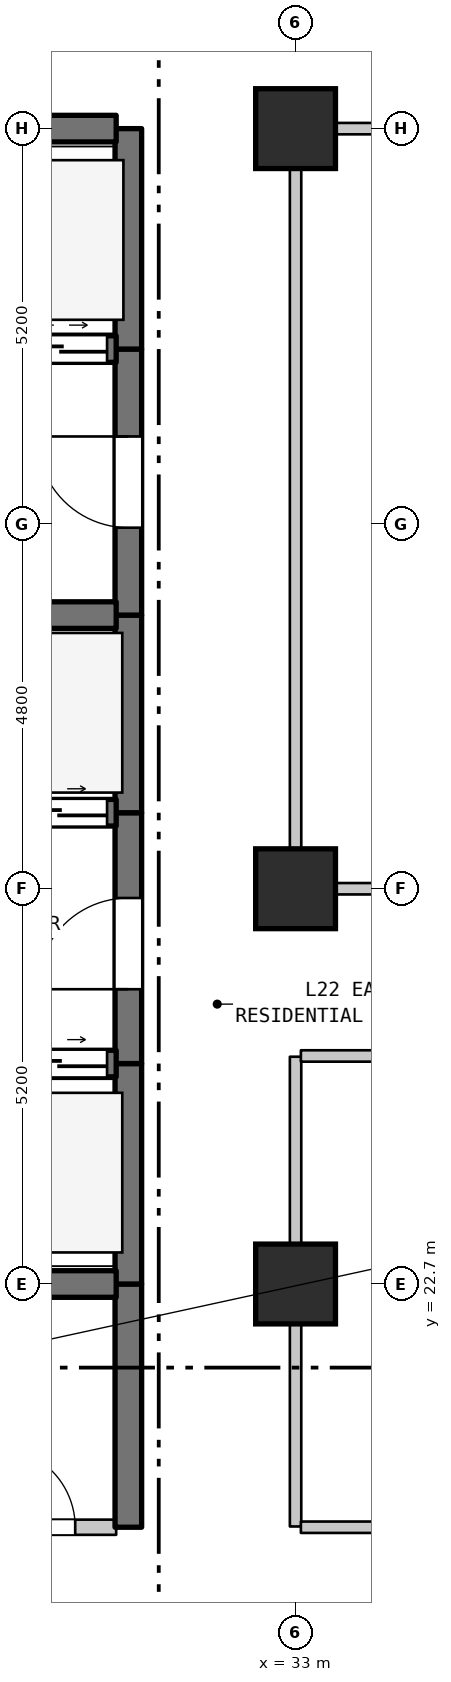
"""IFC4 building model, lengths in metres.
Left out: names, types, materials, properties, quantities, classifications, styles, units other than length and angle.
Written with IfcOpenShell. Run it as: python <this file> out.ifc"""

import sys

from ifc_helpers import new_model, si_unit, direction, frame, frame_2d, origin, origin_2d, place, context, subcontext, project, spatial, rectangle, extrude, element, fill, save


model = new_model("IFC4")
c1 = context("Model", 3, precision=1e-05, world=origin(), true_north=direction((0.0, 1.0)))
c2 = subcontext(c1, "Body", "Model", "MODEL_VIEW")
j1 = project(units=[si_unit("LENGTHUNIT", "METRE"), si_unit("PLANEANGLEUNIT", "RADIAN")], contexts=[c1])
p1 = place(None, origin())
s1 = spatial("IfcSite", under=j1, at=p1, CompositionType="ELEMENT")
p2 = place(p1, origin())
s2 = spatial("IfcBuilding", under=s1, at=p2, CompositionType="ELEMENT")
p3 = place(p2, frame((0.0, 0.0, 94.6)))
s3 = spatial("IfcBuildingStorey", under=s2, at=p3, CompositionType="ELEMENT", Elevation=94.6)
for number, where, z_axis, x_axis in (
    (1, (33.0, 22.7, 0.0), (0.0, 0.0, 1.0), (1.0, 0.0, 0.0)),
    (2, (33.0, 27.9, 0.0), (0.0, 0.0, 1.0), (1.0, 0.0, 0.0)),
    (3, (33.0, 37.9, 0.0), (0.0, 0.0, 1.0), (1.0, 0.0, 0.0)),
):
    element("IfcColumn", number, at=place(p3, frame(where, z_axis=z_axis, x_axis=x_axis)), inside=s3, PredefinedType="COLUMN", context=c2, shape_type="SweptSolid", body=[
        extrude(rectangle(XDim=1.05, YDim=1.05, at=origin_2d()), origin(), (0.0, 0.0, 1.0), 3.7),
    ])
p4 = place(p3, frame((30.8, 19.5, 0.0), z_axis=(0.0, 0.0, 1.0), x_axis=(0.0, 1.0, 0.0)))
e4 = element("IfcWall", 4, at=p4, inside=s3, PredefinedType="SHEAR", context=c2, shape_type="SweptSolid", body=[
    extrude(rectangle(XDim=3.2, YDim=0.35, at=frame_2d((1.6, 0.0))), origin(), (0.0, 0.0, 1.0), 3.385),
])
p5 = place(p3, frame((30.8, 22.7, 0.0), z_axis=(0.0, 0.0, 1.0), x_axis=(0.0, 1.0, 0.0)))
e5 = element("IfcWall", 5, at=p5, inside=s3, PredefinedType="SHEAR", context=c2, shape_type="SweptSolid", body=[
    extrude(rectangle(XDim=2.9, YDim=0.35, at=frame_2d((1.45, 0.0))), origin(), (0.0, 0.0, 1.0), 3.385),
])
p6 = place(p3, frame((30.8, 25.6, 0.0), z_axis=(0.0, 0.0, 1.0), x_axis=(0.0, 1.0, 0.0)))
e6 = element("IfcWall", 6, at=p6, inside=s3, PredefinedType="SHEAR", context=c2, shape_type="SweptSolid", body=[
    extrude(rectangle(XDim=3.3, YDim=0.35, at=frame_2d((1.65, 0.0))), origin(), (0.0, 0.0, 1.0), 3.385),
])
p7 = place(p6, frame((0.978, 0.0, 0.0)))
e7 = element("IfcOpeningElement", 7, at=p7, cuts=e6, PredefinedType="OPENING", context=c2, shape_type="SweptSolid", body=[
    extrude(rectangle(XDim=1.2, YDim=2.2, at=frame_2d((0.6, 1.1))), frame((0.0, 0.185, 0.0), z_axis=(0.0, -1.0, 0.0), x_axis=(1.0, 0.0, 0.0)), (0.0, 0.0, 1.0), 0.37),
])
p8 = place(p3, frame((30.8, 28.9, 0.0), z_axis=(0.0, 0.0, 1.0), x_axis=(0.0, 1.0, 0.0)))
e8 = element("IfcWall", 8, at=p8, inside=s3, PredefinedType="SHEAR", context=c2, shape_type="SweptSolid", body=[
    extrude(rectangle(XDim=2.6, YDim=0.35, at=frame_2d((1.3, 0.0))), origin(), (0.0, 0.0, 1.0), 3.385),
])
p9 = place(p3, frame((30.8, 31.5, 0.0), z_axis=(0.0, 0.0, 1.0), x_axis=(0.0, 1.0, 0.0)))
e9 = element("IfcWall", 9, at=p9, inside=s3, PredefinedType="SHEAR", context=c2, shape_type="SweptSolid", body=[
    extrude(rectangle(XDim=3.5, YDim=0.35, at=frame_2d((1.75, 0.0))), origin(), (0.0, 0.0, 1.0), 3.385),
])
p10 = place(p9, frame((1.15, 0.0, 0.0)))
e10 = element("IfcOpeningElement", 10, at=p10, cuts=e9, PredefinedType="OPENING", context=c2, shape_type="SweptSolid", body=[
    extrude(rectangle(XDim=1.2, YDim=2.2, at=frame_2d((0.6, 1.1))), frame((0.0, 0.185, 0.0), z_axis=(0.0, -1.0, 0.0), x_axis=(1.0, 0.0, 0.0)), (0.0, 0.0, 1.0), 0.37),
])
p11 = place(p3, frame((30.8, 35.0, 0.0), z_axis=(0.0, 0.0, 1.0), x_axis=(0.0, 1.0, 0.0)))
e11 = element("IfcWall", 11, at=p11, inside=s3, PredefinedType="SHEAR", context=c2, shape_type="SweptSolid", body=[
    extrude(rectangle(XDim=2.9, YDim=0.35, at=frame_2d((1.45, 0.0))), origin(), (0.0, 0.0, 1.0), 3.385),
])
p12 = place(p3, frame((33.0, 19.51, 0.0), z_axis=(0.0, 0.0, 1.0), x_axis=(0.0, 1.0, 0.0)))
e12 = element("IfcWall", 12, at=p12, inside=s3, PredefinedType="STANDARD", context=c2, shape_type="SweptSolid", body=[
    extrude(rectangle(XDim=6.18, YDim=0.15, at=frame_2d((3.09, 0.0))), origin(), (0.0, 0.0, 1.0), 2.935),
])
p13 = place(p3, frame((33.0, 27.91, 0.0), z_axis=(0.0, 0.0, 1.0), x_axis=(0.0, 1.0, 0.0)))
e13 = element("IfcWall", 13, at=p13, inside=s3, PredefinedType="STANDARD", context=c2, shape_type="SweptSolid", body=[
    extrude(rectangle(XDim=9.98, YDim=0.15, at=frame_2d((4.99, 0.0))), origin(), (0.0, 0.0, 1.0), 2.885),
])
p14 = place(p3, frame((28.585, 19.5, 0.0), z_axis=(0.0, 0.0, 1.0), x_axis=(1.0, 0.0, 0.0)))
e14 = element("IfcWall", 14, at=p14, inside=s3, PredefinedType="STANDARD", context=c2, shape_type="SweptSolid", body=[
    extrude(rectangle(XDim=2.055, YDim=0.2, at=frame_2d((1.027, 0.0))), origin(), (0.0, 0.0, 1.0), 3.385),
])
p15 = place(p14, frame((0.466, 0.0, 0.0)))
e15 = element("IfcOpeningElement", 15, at=p15, cuts=e14, PredefinedType="OPENING", context=c2, shape_type="SweptSolid", body=[
    extrude(rectangle(XDim=1.05, YDim=2.15, at=frame_2d((0.525, 1.075))), frame((0.0, 0.11, 0.0), z_axis=(0.0, -1.0, 0.0), x_axis=(1.0, 0.0, 0.0)), (0.0, 0.0, 1.0), 0.22),
])
p16 = place(p3, frame((33.07, 19.5, 0.0), z_axis=(0.0, 0.0, 1.0), x_axis=(1.0, 0.0, 0.0)))
e16 = element("IfcWall", 16, at=p16, inside=s3, PredefinedType="STANDARD", context=c2, shape_type="SweptSolid", body=[
    extrude(rectangle(XDim=21.51, YDim=0.15, at=frame_2d((10.755, 0.0))), origin(), (0.0, 0.0, 1.0), 3.385),
])
p17 = place(p3, frame((28.585, 22.7, 0.0), z_axis=(0.0, 0.0, 1.0), x_axis=(1.0, 0.0, 0.0)))
e17 = element("IfcWall", 17, at=p17, inside=s3, PredefinedType="SHEAR", context=c2, shape_type="SweptSolid", body=[
    extrude(rectangle(XDim=2.055, YDim=0.35, at=frame_2d((1.027, 0.0))), origin(), (0.0, 0.0, 1.0), 3.385),
])
p18 = place(p3, frame((27.46, 25.6, 0.0), z_axis=(0.0, 0.0, 1.0), x_axis=(1.0, 0.0, 0.0)))
e18 = element("IfcWall", 18, at=p18, inside=s3, PredefinedType="SHEAR", context=c2, shape_type="SweptSolid", body=[
    extrude(rectangle(XDim=3.18, YDim=0.35, at=frame_2d((1.59, 0.0))), origin(), (0.0, 0.0, 1.0), 3.385),
])
p19 = place(p18, frame((0.12, 0.0, 0.0)))
e19 = element("IfcOpeningElement", 19, at=p19, cuts=e18, PredefinedType="OPENING", context=c2, shape_type="SweptSolid", body=[
    extrude(rectangle(XDim=1.25, YDim=2.2, at=frame_2d((0.625, 1.1))), frame((0.0, 0.185, 0.0), z_axis=(0.0, -1.0, 0.0), x_axis=(1.0, 0.0, 0.0)), (0.0, 0.0, 1.0), 0.37),
])
p20 = place(p18, frame((1.81, 0.0, 0.0)))
e20 = element("IfcOpeningElement", 20, at=p20, cuts=e18, PredefinedType="OPENING", context=c2, shape_type="SweptSolid", body=[
    extrude(rectangle(XDim=1.25, YDim=2.2, at=frame_2d((0.625, 1.1))), frame((0.0, 0.185, 0.0), z_axis=(0.0, -1.0, 0.0), x_axis=(1.0, 0.0, 0.0)), (0.0, 0.0, 1.0), 0.37),
])
p21 = place(p3, frame((33.07, 25.7, 0.0), z_axis=(0.0, 0.0, 1.0), x_axis=(1.0, 0.0, 0.0)))
e21 = element("IfcWall", 21, at=p21, inside=s3, PredefinedType="STANDARD", context=c2, shape_type="SweptSolid", body=[
    extrude(rectangle(XDim=21.51, YDim=0.15, at=frame_2d((10.755, 0.0))), origin(), (0.0, 0.0, 1.0), 3.385),
])
p22 = place(p3, frame((33.07, 27.9, 0.0), z_axis=(0.0, 0.0, 1.0), x_axis=(1.0, 0.0, 0.0)))
e22 = element("IfcWall", 22, at=p22, inside=s3, PredefinedType="STANDARD", context=c2, shape_type="SweptSolid", body=[
    extrude(rectangle(XDim=11.93, YDim=0.15, at=frame_2d((5.965, 0.0))), origin(), (0.0, 0.0, 1.0), 2.885),
])
p23 = place(p22, frame((10.185, 0.0, 0.0)))
e23 = element("IfcOpeningElement", 23, at=p23, cuts=e22, PredefinedType="OPENING", context=c2, shape_type="SweptSolid", body=[
    extrude(rectangle(XDim=1.0, YDim=2.15, at=frame_2d((0.5, 1.075))), frame((0.0, 0.085, 0.0), z_axis=(0.0, -1.0, 0.0), x_axis=(1.0, 0.0, 0.0)), (0.0, 0.0, 1.0), 0.17),
])
p24 = place(p3, frame((27.46, 28.9, 0.0), z_axis=(0.0, 0.0, 1.0), x_axis=(1.0, 0.0, 0.0)))
e24 = element("IfcWall", 24, at=p24, inside=s3, PredefinedType="SHEAR", context=c2, shape_type="SweptSolid", body=[
    extrude(rectangle(XDim=3.18, YDim=0.35, at=frame_2d((1.59, 0.0))), origin(), (0.0, 0.0, 1.0), 3.385),
])
p25 = place(p24, frame((0.12, 0.0, 0.0)))
e25 = element("IfcOpeningElement", 25, at=p25, cuts=e24, PredefinedType="OPENING", context=c2, shape_type="SweptSolid", body=[
    extrude(rectangle(XDim=1.25, YDim=2.2, at=frame_2d((0.625, 1.1))), frame((0.0, 0.185, 0.0), z_axis=(0.0, -1.0, 0.0), x_axis=(1.0, 0.0, 0.0)), (0.0, 0.0, 1.0), 0.37),
])
p26 = place(p24, frame((1.81, 0.0, 0.0)))
e26 = element("IfcOpeningElement", 26, at=p26, cuts=e24, PredefinedType="OPENING", context=c2, shape_type="SweptSolid", body=[
    extrude(rectangle(XDim=1.25, YDim=2.2, at=frame_2d((0.625, 1.1))), frame((0.0, 0.185, 0.0), z_axis=(0.0, -1.0, 0.0), x_axis=(1.0, 0.0, 0.0)), (0.0, 0.0, 1.0), 0.37),
])
p27 = place(p3, frame((27.46, 31.5, 0.0), z_axis=(0.0, 0.0, 1.0), x_axis=(1.0, 0.0, 0.0)))
e27 = element("IfcWall", 27, at=p27, inside=s3, PredefinedType="SHEAR", context=c2, shape_type="SweptSolid", body=[
    extrude(rectangle(XDim=3.18, YDim=0.35, at=frame_2d((1.59, 0.0))), origin(), (0.0, 0.0, 1.0), 3.385),
])
p28 = place(p3, frame((19.16, 35.0, 0.0), z_axis=(0.0, 0.0, 1.0), x_axis=(1.0, 0.0, 0.0)))
e28 = element("IfcWall", 28, at=p28, inside=s3, PredefinedType="SHEAR", context=c2, shape_type="SweptSolid", body=[
    extrude(rectangle(XDim=11.48, YDim=0.35, at=frame_2d((5.74, 0.0))), origin(), (0.0, 0.0, 1.0), 3.385),
])
p29 = place(p28, frame((0.365, 0.0, 0.0)))
e29 = element("IfcOpeningElement", 29, at=p29, cuts=e28, PredefinedType="OPENING", context=c2, shape_type="SweptSolid", body=[
    extrude(rectangle(XDim=1.35, YDim=2.2, at=frame_2d((0.675, 1.1))), frame((0.0, 0.185, 0.0), z_axis=(0.0, -1.0, 0.0), x_axis=(1.0, 0.0, 0.0)), (0.0, 0.0, 1.0), 0.37),
])
p30 = place(p28, frame((2.765, 0.0, 0.0)))
e30 = element("IfcOpeningElement", 30, at=p30, cuts=e28, PredefinedType="OPENING", context=c2, shape_type="SweptSolid", body=[
    extrude(rectangle(XDim=1.35, YDim=2.2, at=frame_2d((0.675, 1.1))), frame((0.0, 0.185, 0.0), z_axis=(0.0, -1.0, 0.0), x_axis=(1.0, 0.0, 0.0)), (0.0, 0.0, 1.0), 0.37),
])
p31 = place(p28, frame((4.915, 0.0, 0.0)))
e31 = element("IfcOpeningElement", 31, at=p31, cuts=e28, PredefinedType="OPENING", context=c2, shape_type="SweptSolid", body=[
    extrude(rectangle(XDim=1.2, YDim=2.2, at=frame_2d((0.6, 1.1))), frame((0.0, 0.185, 0.0), z_axis=(0.0, -1.0, 0.0), x_axis=(1.0, 0.0, 0.0)), (0.0, 0.0, 1.0), 0.37),
])
p32 = place(p28, frame((6.665, 0.0, 0.0)))
e32 = element("IfcOpeningElement", 32, at=p32, cuts=e28, PredefinedType="OPENING", context=c2, shape_type="SweptSolid", body=[
    extrude(rectangle(XDim=1.2, YDim=2.2, at=frame_2d((0.6, 1.1))), frame((0.0, 0.185, 0.0), z_axis=(0.0, -1.0, 0.0), x_axis=(1.0, 0.0, 0.0)), (0.0, 0.0, 1.0), 0.37),
])
p33 = place(p28, frame((8.415, 0.0, 0.0)))
e33 = element("IfcOpeningElement", 33, at=p33, cuts=e28, PredefinedType="OPENING", context=c2, shape_type="SweptSolid", body=[
    extrude(rectangle(XDim=1.2, YDim=2.2, at=frame_2d((0.6, 1.1))), frame((0.0, 0.185, 0.0), z_axis=(0.0, -1.0, 0.0), x_axis=(1.0, 0.0, 0.0)), (0.0, 0.0, 1.0), 0.37),
])
p34 = place(p28, frame((10.16, 0.0, 0.0)))
e34 = element("IfcOpeningElement", 34, at=p34, cuts=e28, PredefinedType="OPENING", context=c2, shape_type="SweptSolid", body=[
    extrude(rectangle(XDim=1.2, YDim=2.2, at=frame_2d((0.6, 1.1))), frame((0.0, 0.185, 0.0), z_axis=(0.0, -1.0, 0.0), x_axis=(1.0, 0.0, 0.0)), (0.0, 0.0, 1.0), 0.37),
])
p35 = place(p3, frame((19.16, 37.9, 0.0), z_axis=(0.0, 0.0, 1.0), x_axis=(1.0, 0.0, 0.0)))
e35 = element("IfcWall", 35, at=p35, inside=s3, PredefinedType="SHEAR", context=c2, shape_type="SweptSolid", body=[
    extrude(rectangle(XDim=11.48, YDim=0.35, at=frame_2d((5.74, 0.0))), origin(), (0.0, 0.0, 1.0), 3.385),
])
p36 = place(p3, frame((33.07, 37.9, 0.0), z_axis=(0.0, 0.0, 1.0), x_axis=(1.0, 0.0, 0.0)))
e36 = element("IfcWall", 36, at=p36, inside=s3, PredefinedType="STANDARD", context=c2, shape_type="SweptSolid", body=[
    extrude(rectangle(XDim=26.935, YDim=0.15, at=frame_2d((13.467, 0.0))), origin(), (0.0, 0.0, 1.0), 3.385),
])
p37 = place(p36, frame((12.96, 0.0, 0.0)))
e37 = element("IfcOpeningElement", 37, at=p37, cuts=e36, PredefinedType="OPENING", context=c2, shape_type="SweptSolid", body=[
    extrude(rectangle(XDim=1.0, YDim=2.15, at=frame_2d((0.5, 1.075))), frame((0.0, 0.085, 0.0), z_axis=(0.0, -1.0, 0.0), x_axis=(1.0, 0.0, 0.0)), (0.0, 0.0, 1.0), 0.17),
])
p38 = place(p7, origin())
e38 = element("IfcDoor", 38, at=p38, inside=s3, OperationType="SINGLE_SWING_LEFT", PredefinedType="DOOR", context=c2, shape_type="SweptSolid", body=[
    extrude(rectangle(XDim=1.2, YDim=2.2, at=frame_2d((0.6, 1.1))), frame((0.0, 0.025, 0.0), z_axis=(0.0, -1.0, 0.0), x_axis=(1.0, 0.0, 0.0)), (0.0, 0.0, 1.0), 0.05),
])
fill(e7, e38)
p39 = place(p10, origin())
e39 = element("IfcDoor", 39, at=p39, inside=s3, OperationType="SINGLE_SWING_RIGHT", PredefinedType="DOOR", context=c2, shape_type="SweptSolid", body=[
    extrude(rectangle(XDim=1.2, YDim=2.2, at=frame_2d((0.6, 1.1))), frame((0.0, 0.025, 0.0), z_axis=(0.0, -1.0, 0.0), x_axis=(1.0, 0.0, 0.0)), (0.0, 0.0, 1.0), 0.05),
])
fill(e10, e39)
p40 = place(p15, origin())
e40 = element("IfcDoor", 40, at=p40, inside=s3, OperationType="SINGLE_SWING_LEFT", PredefinedType="DOOR", context=c2, shape_type="SweptSolid", body=[
    extrude(rectangle(XDim=1.05, YDim=2.15, at=frame_2d((0.525, 1.075))), frame((0.0, 0.025, 0.0), z_axis=(0.0, -1.0, 0.0), x_axis=(1.0, 0.0, 0.0)), (0.0, 0.0, 1.0), 0.05),
])
fill(e15, e40)
p41 = place(p20, origin())
e41 = element("IfcDoor", 41, at=p41, inside=s3, OperationType="DOUBLE_DOOR_SLIDING", PredefinedType="DOOR", context=c2, shape_type="SweptSolid", body=[
    extrude(rectangle(XDim=1.25, YDim=2.2, at=frame_2d((0.625, 1.1))), frame((0.0, 0.025, 0.0), z_axis=(0.0, -1.0, 0.0), x_axis=(1.0, 0.0, 0.0)), (0.0, 0.0, 1.0), 0.05),
])
fill(e20, e41)
p42 = place(p26, origin())
e42 = element("IfcDoor", 42, at=p42, inside=s3, OperationType="DOUBLE_DOOR_SLIDING", PredefinedType="DOOR", context=c2, shape_type="SweptSolid", body=[
    extrude(rectangle(XDim=1.25, YDim=2.2, at=frame_2d((0.625, 1.1))), frame((0.0, 0.025, 0.0), z_axis=(0.0, -1.0, 0.0), x_axis=(1.0, 0.0, 0.0)), (0.0, 0.0, 1.0), 0.05),
])
fill(e26, e42)
p43 = place(p34, origin())
e43 = element("IfcDoor", 43, at=p43, inside=s3, OperationType="DOUBLE_DOOR_SLIDING", PredefinedType="DOOR", context=c2, shape_type="SweptSolid", body=[
    extrude(rectangle(XDim=1.2, YDim=2.2, at=frame_2d((0.6, 1.1))), frame((0.0, 0.025, 0.0), z_axis=(0.0, -1.0, 0.0), x_axis=(1.0, 0.0, 0.0)), (0.0, 0.0, 1.0), 0.05),
])
fill(e34, e43)
save(model, sys.argv[1])
